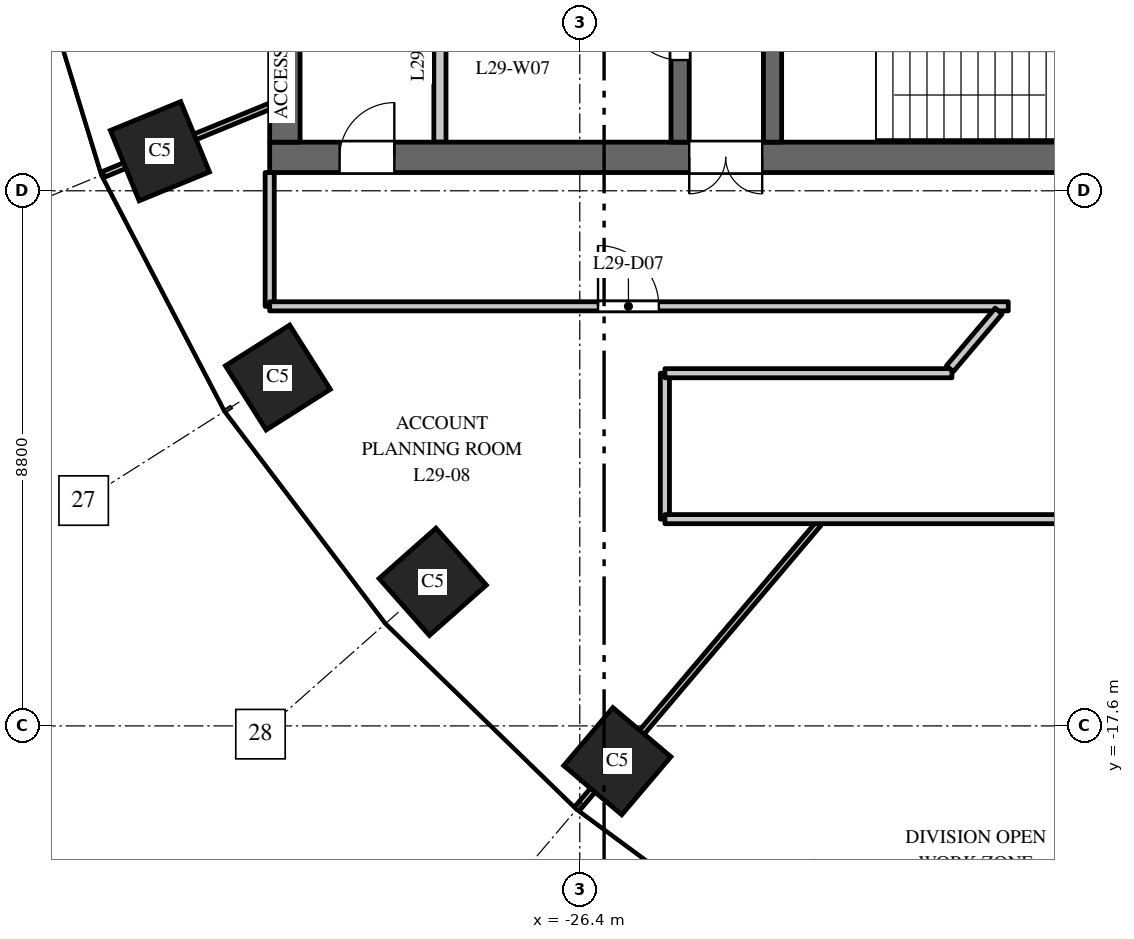
"""IFC4 building model, lengths in metres.
Left out: names, types, materials, properties, quantities, classifications, styles, units other than length and angle.
Written with IfcOpenShell. Run it as: python <this file> out.ifc"""

import sys

from ifc_helpers import new_model, si_unit, direction, frame, frame_2d, origin, origin_2d, place, context, subcontext, project, spatial, rectangle, extrude, element, fill, save


model = new_model("IFC4")
c1 = context("Model", 3, precision=1e-05, world=origin(), true_north=direction((0.0, 1.0)))
c2 = subcontext(c1, "Body", "Model", "MODEL_VIEW")
j1 = project(units=[si_unit("LENGTHUNIT", "METRE"), si_unit("PLANEANGLEUNIT", "RADIAN")], contexts=[c1])
p1 = place(None, origin())
s1 = spatial("IfcSite", under=j1, at=p1, CompositionType="ELEMENT")
p2 = place(p1, origin())
s2 = spatial("IfcBuilding", under=s1, at=p2, CompositionType="ELEMENT")
p3 = place(p2, frame((0.0, 0.0, 128.0)))
s3 = spatial("IfcBuildingStorey", under=s2, at=p3, CompositionType="ELEMENT", Elevation=128.0)
for number, where, z_axis, x_axis in (
    (1, (-33.305, -8.149, 0.0), (0.0, 0.0, 1.0), (0.379, -0.925, 0.0)),
    (2, (-31.365, -11.871, 0.0), (0.0, 0.0, 1.0), (0.535, -0.845, 0.0)),
    (3, (-28.819, -15.23, 0.0), (0.0, 0.0, 1.0), (0.663, -0.749, 0.0)),
    (4, (-25.783, -18.18, 0.0), (0.0, 0.0, 1.0), (0.763, -0.646, 0.0)),
):
    element("IfcColumn", number, at=place(p3, frame(where, z_axis=z_axis, x_axis=x_axis)), inside=s3, PredefinedType="COLUMN", context=c2, shape_type="SweptSolid", body=[
        extrude(rectangle(XDim=1.25, YDim=1.25, at=origin_2d()), origin(), (0.0, 0.0, 1.0), 4.0),
    ])
p4 = place(p3, frame((-16.5, -8.25, 0.0), z_axis=(0.0, 0.0, 1.0), x_axis=(-1.0, 0.0, 0.0)))
e5 = element("IfcWall", 5, at=p4, inside=s3, PredefinedType="SHEAR", context=c2, shape_type="SweptSolid", body=[
    extrude(rectangle(XDim=15.0, YDim=0.5, at=frame_2d((7.5, 0.0))), origin(), (0.0, 0.0, 1.0), 3.7),
])
p5 = place(p4, frame((6.9, 0.0, 0.0)))
e6 = element("IfcOpeningElement", 6, at=p5, cuts=e5, PredefinedType="OPENING", context=c2, shape_type="SweptSolid", body=[
    extrude(rectangle(XDim=1.2, YDim=2.1, at=frame_2d((0.6, 1.05))), frame((0.0, 0.26, 0.0), z_axis=(0.0, -1.0, 0.0), x_axis=(1.0, 0.0, 0.0)), (0.0, 0.0, 1.0), 0.52),
])
p6 = place(p4, frame((12.95, 0.0, 0.0)))
e7 = element("IfcOpeningElement", 7, at=p6, cuts=e5, PredefinedType="OPENING", context=c2, shape_type="SweptSolid", body=[
    extrude(rectangle(XDim=0.9, YDim=2.1, at=frame_2d((0.45, 1.05))), frame((0.0, 0.26, 0.0), z_axis=(0.0, -1.0, 0.0), x_axis=(1.0, 0.0, 0.0)), (0.0, 0.0, 1.0), 0.52),
])
p7 = place(p3, frame((-24.75, -8.0, 0.0), z_axis=(0.0, 0.0, 1.0), x_axis=(0.0, 1.0, 0.0)))
e8 = element("IfcWall", 8, at=p7, inside=s3, PredefinedType="SHEAR", context=c2, shape_type="SweptSolid", body=[
    extrude(rectangle(XDim=16.0, YDim=0.3, at=frame_2d((8.0, 0.0))), origin(), (0.0, 0.0, 1.0), 3.7),
])
p8 = place(p7, frame((4.425, 0.0, 0.0)))
e9 = element("IfcOpeningElement", 9, at=p8, cuts=e8, PredefinedType="OPENING", context=c2, shape_type="SweptSolid", body=[
    extrude(rectangle(XDim=1.1, YDim=2.1, at=frame_2d((0.55, 1.05))), frame((0.0, 0.16, 0.0), z_axis=(0.0, -1.0, 0.0), x_axis=(1.0, 0.0, 0.0)), (0.0, 0.0, 1.0), 0.32),
])
p9 = place(p7, frame((7.45, 0.0, 0.0)))
e10 = element("IfcOpeningElement", 10, at=p9, cuts=e8, PredefinedType="OPENING", context=c2, shape_type="SweptSolid", body=[
    extrude(rectangle(XDim=1.1, YDim=2.1, at=frame_2d((0.55, 1.05))), frame((0.0, 0.16, 0.0), z_axis=(0.0, -1.0, 0.0), x_axis=(1.0, 0.0, 0.0)), (0.0, 0.0, 1.0), 0.32),
])
p10 = place(p7, frame((10.425, 0.0, 0.0)))
e11 = element("IfcOpeningElement", 11, at=p10, cuts=e8, PredefinedType="OPENING", context=c2, shape_type="SweptSolid", body=[
    extrude(rectangle(XDim=1.2, YDim=2.1, at=frame_2d((0.6, 1.05))), frame((0.0, 0.16, 0.0), z_axis=(0.0, -1.0, 0.0), x_axis=(1.0, 0.0, 0.0)), (0.0, 0.0, 1.0), 0.32),
])
p11 = place(p7, frame((13.75, 0.0, 0.0)))
e12 = element("IfcOpeningElement", 12, at=p11, cuts=e8, PredefinedType="OPENING", context=c2, shape_type="SweptSolid", body=[
    extrude(rectangle(XDim=0.9, YDim=2.1, at=frame_2d((0.45, 1.05))), frame((0.0, 0.16, 0.0), z_axis=(0.0, -1.0, 0.0), x_axis=(1.0, 0.0, 0.0)), (0.0, 0.0, 1.0), 0.32),
])
p12 = place(p7, frame((1.35, 0.0, 0.0)))
e13 = element("IfcOpeningElement", 13, at=p12, cuts=e8, PredefinedType="OPENING", context=c2, shape_type="SweptSolid", body=[
    extrude(rectangle(XDim=0.9, YDim=2.1, at=frame_2d((0.45, 1.05))), frame((0.0, 0.16, 0.0), z_axis=(0.0, -1.0, 0.0), x_axis=(1.0, 0.0, 0.0)), (0.0, 0.0, 1.0), 0.32),
])
p13 = place(p3, frame((-31.25, -8.0, 0.0), z_axis=(0.0, 0.0, 1.0), x_axis=(0.0, 1.0, 0.0)))
e14 = element("IfcWall", 14, at=p13, inside=s3, PredefinedType="SHEAR", context=c2, shape_type="SweptSolid", body=[
    extrude(rectangle(XDim=16.0, YDim=0.5, at=frame_2d((8.0, 0.0))), origin(), (0.0, 0.0, 1.0), 3.7),
])
p14 = place(p3, frame((-28.7, -8.0, 0.0), z_axis=(0.0, 0.0, 1.0), x_axis=(0.0, 1.0, 0.0)))
e15 = element("IfcWall", 15, at=p14, inside=s3, PredefinedType="PARTITIONING", context=c2, shape_type="SweptSolid", body=[
    extrude(rectangle(XDim=3.25, YDim=0.2, at=frame_2d((1.625, 0.0))), origin(), (0.0, 0.0, 1.0), 3.7),
])
p15 = place(p3, frame((-23.23, -8.0, 0.0), z_axis=(0.0, 0.0, 1.0), x_axis=(0.0, 1.0, 0.0)))
e16 = element("IfcWall", 16, at=p15, inside=s3, PredefinedType="SHEAR", context=c2, shape_type="SweptSolid", body=[
    extrude(rectangle(XDim=7.875, YDim=0.3, at=frame_2d((3.938, 0.0))), origin(), (0.0, 0.0, 1.0), 3.7),
])
p16 = place(p15, frame((5.15, 0.0, 0.0)))
e17 = element("IfcOpeningElement", 17, at=p16, cuts=e16, PredefinedType="OPENING", context=c2, shape_type="SweptSolid", body=[
    extrude(rectangle(XDim=1.1, YDim=2.1, at=frame_2d((0.55, 1.05))), frame((0.0, 0.16, 0.0), z_axis=(0.0, -1.0, 0.0), x_axis=(1.0, 0.0, 0.0)), (0.0, 0.0, 1.0), 0.32),
])
p17 = place(p3, frame((-34.234, -8.53, 0.0), z_axis=(0.0, 0.0, 1.0), x_axis=(0.925344112436, 0.379128307542, 0.0)))
e18 = element("IfcWall", 18, at=p17, inside=s3, PredefinedType="PARTITIONING", context=c2, shape_type="SweptSolid", body=[
    extrude(rectangle(XDim=2.954, YDim=0.1, at=frame_2d((1.477, 0.0))), origin(), (0.0, 0.0, 1.0), 2.9),
])
p18 = place(p3, frame((-31.5, -10.7, 0.0), z_axis=(0.0, 0.0, 1.0), x_axis=(0.0, 1.0, 0.0)))
e19 = element("IfcWall", 19, at=p18, inside=s3, PredefinedType="PARTITIONING", context=c2, shape_type="SweptSolid", body=[
    extrude(rectangle(XDim=2.2, YDim=0.15, at=frame_2d((1.1, 0.0))), origin(), (0.0, 0.0, 1.0), 3.7),
])
p19 = place(p3, frame((-31.5, -10.7, 0.0), z_axis=(0.0, 0.0, 1.0), x_axis=(1.0, 0.0, 0.0)))
e20 = element("IfcWall", 20, at=p19, inside=s3, PredefinedType="PARTITIONING", context=c2, shape_type="SweptSolid", body=[
    extrude(rectangle(XDim=12.147, YDim=0.15, at=frame_2d((6.073, 0.0))), origin(), (0.0, 0.0, 1.0), 3.1),
])
p20 = place(p19, frame((5.4, 0.0, 0.0)))
e21 = element("IfcOpeningElement", 21, at=p20, cuts=e20, PredefinedType="OPENING", context=c2, shape_type="SweptSolid", body=[
    extrude(rectangle(XDim=1.0, YDim=2.1, at=frame_2d((0.5, 1.05))), frame((0.0, 0.085, 0.0), z_axis=(0.0, -1.0, 0.0), x_axis=(1.0, 0.0, 0.0)), (0.0, 0.0, 1.0), 0.17),
])
p21 = place(p3, frame((-26.43, -18.945, 0.0), z_axis=(0.0, 0.0, 1.0), x_axis=(0.646335552338, 0.763053309923, 0.0)))
e22 = element("IfcWall", 22, at=p21, inside=s3, PredefinedType="PARTITIONING", context=c2, shape_type="SweptSolid", body=[
    extrude(rectangle(XDim=6.12, YDim=0.1, at=frame_2d((3.06, 0.0))), origin(), (0.0, 0.0, 1.0), 3.7),
])
p22 = place(p3, frame((-25.0, -14.2, 0.0), z_axis=(0.0, 0.0, 1.0), x_axis=(0.0, 1.0, 0.0)))
e23 = element("IfcWall", 23, at=p22, inside=s3, PredefinedType="PARTITIONING", context=c2, shape_type="SweptSolid", body=[
    extrude(rectangle(XDim=2.4, YDim=0.15, at=frame_2d((1.2, 0.0))), origin(), (0.0, 0.0, 1.0), 3.7),
])
p23 = place(p3, frame((-25.0, -14.2, 0.0), z_axis=(0.0, 0.0, 1.0), x_axis=(1.0, 0.0, 0.0)))
e24 = element("IfcWall", 24, at=p23, inside=s3, PredefinedType="PARTITIONING", context=c2, shape_type="SweptSolid", body=[
    extrude(rectangle(XDim=13.961, YDim=0.15, at=frame_2d((6.98, 0.0))), origin(), (0.0, 0.0, 1.0), 2.75),
])
p24 = place(p23, frame((7.734, 0.0, 0.0)))
e25 = element("IfcOpeningElement", 25, at=p24, cuts=e24, PredefinedType="OPENING", context=c2, shape_type="SweptSolid", body=[
    extrude(rectangle(XDim=1.0, YDim=2.1, at=frame_2d((0.5, 1.05))), frame((0.0, 0.085, 0.0), z_axis=(0.0, -1.0, 0.0), x_axis=(1.0, 0.0, 0.0)), (0.0, 0.0, 1.0), 0.17),
])
p25 = place(p3, frame((-25.0, -11.8, 0.0), z_axis=(0.0, 0.0, 1.0), x_axis=(1.0, 0.0, 0.0)))
e26 = element("IfcWall", 26, at=p25, inside=s3, PredefinedType="PARTITIONING", context=c2, shape_type="SweptSolid", body=[
    extrude(rectangle(XDim=4.721, YDim=0.15, at=frame_2d((2.36, 0.0))), origin(), (0.0, 0.0, 1.0), 3.7),
])
p26 = place(p3, frame((-20.313, -11.725, 0.0), z_axis=(0.0, 0.0, 1.0), x_axis=(0.646259667917, 0.763117580471, 0.0)))
e27 = element("IfcWall", 27, at=p26, inside=s3, PredefinedType="PARTITIONING", context=c2, shape_type="SweptSolid", body=[
    extrude(rectangle(XDim=1.241, YDim=0.15, at=frame_2d((0.621, 0.0))), origin(), (0.0, 0.0, 1.0), 3.7),
])
p27 = place(p5, origin())
e28 = element("IfcDoor", 28, at=p27, inside=s3, OperationType="DOUBLE_DOOR_DOUBLE_SWING", PredefinedType="DOOR", context=c2, shape_type="SweptSolid", body=[
    extrude(rectangle(XDim=1.2, YDim=2.1, at=frame_2d((0.6, 1.05))), frame((0.0, 0.025, 0.0), z_axis=(0.0, -1.0, 0.0), x_axis=(1.0, 0.0, 0.0)), (0.0, 0.0, 1.0), 0.05),
])
fill(e6, e28)
p28 = place(p12, origin())
e29 = element("IfcDoor", 29, at=p28, inside=s3, OperationType="SINGLE_SWING_LEFT", PredefinedType="DOOR", context=c2, shape_type="SweptSolid", body=[
    extrude(rectangle(XDim=0.9, YDim=2.1, at=frame_2d((0.45, 1.05))), frame((0.0, 0.025, 0.0), z_axis=(0.0, -1.0, 0.0), x_axis=(1.0, 0.0, 0.0)), (0.0, 0.0, 1.0), 0.05),
])
fill(e13, e29)
p29 = place(p6, origin())
e30 = element("IfcDoor", 30, at=p29, inside=s3, OperationType="SINGLE_SWING_LEFT", PredefinedType="DOOR", context=c2, shape_type="SweptSolid", body=[
    extrude(rectangle(XDim=0.9, YDim=2.1, at=frame_2d((0.45, 1.05))), frame((0.0, 0.025, 0.0), z_axis=(0.0, -1.0, 0.0), x_axis=(1.0, 0.0, 0.0)), (0.0, 0.0, 1.0), 0.05),
])
fill(e7, e30)
p30 = place(p20, origin())
e31 = element("IfcDoor", 31, at=p30, inside=s3, OperationType="SINGLE_SWING_LEFT", PredefinedType="DOOR", context=c2, shape_type="SweptSolid", body=[
    extrude(rectangle(XDim=1.0, YDim=2.1, at=frame_2d((0.5, 1.05))), frame((0.0, 0.025, 0.0), z_axis=(0.0, -1.0, 0.0), x_axis=(1.0, 0.0, 0.0)), (0.0, 0.0, 1.0), 0.05),
])
fill(e21, e31)
save(model, sys.argv[1])
